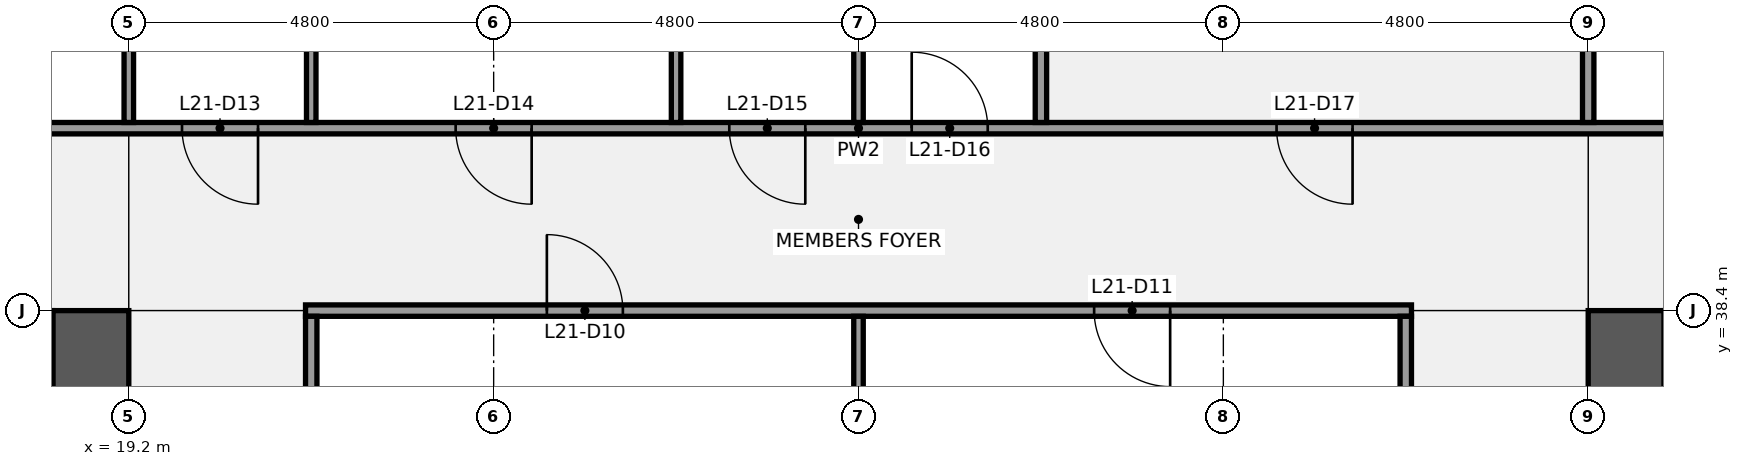
"""IFC4 building model, lengths in metres.
Left out: names, types, materials, properties, quantities, classifications, styles, units other than length and angle.
Written with IfcOpenShell. Run it as: python <this file> out.ifc"""

import sys

from ifc_helpers import new_model, si_unit, direction, frame, frame_2d, origin, place, context, subcontext, project, spatial, rectangle, extrude, element, fill, save


model = new_model("IFC4")
c1 = context("Model", 3, precision=1e-05, world=origin(), true_north=direction((0.0, 1.0)))
c2 = subcontext(c1, "Body", "Model", "MODEL_VIEW")
j1 = project(units=[si_unit("LENGTHUNIT", "METRE"), si_unit("PLANEANGLEUNIT", "RADIAN")], contexts=[c1])
p1 = place(None, origin())
s1 = spatial("IfcSite", under=j1, at=p1, CompositionType="ELEMENT")
p2 = place(p1, origin())
s2 = spatial("IfcBuilding", under=s1, at=p2, CompositionType="ELEMENT")
p3 = place(p2, frame((0.0, 0.0, 104.1)))
s3 = spatial("IfcBuildingStorey", under=s2, at=p3, CompositionType="ELEMENT", Elevation=104.1)
p4 = place(p3, frame((18.7, 38.4, 0.0), z_axis=(0.0, 0.0, 1.0), x_axis=(0.0, -1.0, 0.0)))
e1 = element("IfcWall", 1, at=p4, inside=s3, PredefinedType="SHEAR", context=c2, shape_type="SweptSolid", body=[
    extrude(rectangle(XDim=28.8, YDim=1.0, at=frame_2d((14.4, 0.0))), origin(), (0.0, 0.0, 1.0), 3.84),
])
p5 = place(p4, frame((18.3, 0.0, 0.0)))
e2 = element("IfcOpeningElement", 2, at=p5, cuts=e1, PredefinedType="OPENING", context=c2, shape_type="SweptSolid", body=[
    extrude(rectangle(XDim=1.8, YDim=2.1, at=frame_2d((0.9, 1.05))), frame((0.0, 0.51, 0.0), z_axis=(0.0, -1.0, 0.0), x_axis=(1.0, 0.0, 0.0)), (0.0, 0.0, 1.0), 1.02),
])
p6 = place(p4, frame((8.7, 0.0, 0.0)))
e3 = element("IfcOpeningElement", 3, at=p6, cuts=e1, PredefinedType="OPENING", context=c2, shape_type="SweptSolid", body=[
    extrude(rectangle(XDim=1.8, YDim=2.1, at=frame_2d((0.9, 1.05))), frame((0.0, 0.51, 0.0), z_axis=(0.0, -1.0, 0.0), x_axis=(1.0, 0.0, 0.0)), (0.0, 0.0, 1.0), 1.02),
])
p7 = place(p3, frame((38.9, 9.6, 0.0), z_axis=(0.0, 0.0, 1.0), x_axis=(0.0, 1.0, 0.0)))
e4 = element("IfcWall", 4, at=p7, inside=s3, PredefinedType="SHEAR", context=c2, shape_type="SweptSolid", body=[
    extrude(rectangle(XDim=28.8, YDim=1.0, at=frame_2d((14.4, 0.0))), origin(), (0.0, 0.0, 1.0), 3.84),
])
p8 = place(p7, frame((8.7, 0.0, 0.0)))
e5 = element("IfcOpeningElement", 5, at=p8, cuts=e4, PredefinedType="OPENING", context=c2, shape_type="SweptSolid", body=[
    extrude(rectangle(XDim=1.8, YDim=2.1, at=frame_2d((0.9, 1.05))), frame((0.0, 0.51, 0.0), z_axis=(0.0, -1.0, 0.0), x_axis=(1.0, 0.0, 0.0)), (0.0, 0.0, 1.0), 1.02),
])
p9 = place(p7, frame((18.3, 0.0, 0.0)))
e6 = element("IfcOpeningElement", 6, at=p9, cuts=e4, PredefinedType="OPENING", context=c2, shape_type="SweptSolid", body=[
    extrude(rectangle(XDim=1.8, YDim=2.1, at=frame_2d((0.9, 1.05))), frame((0.0, 0.51, 0.0), z_axis=(0.0, -1.0, 0.0), x_axis=(1.0, 0.0, 0.0)), (0.0, 0.0, 1.0), 1.02),
])
p10 = place(p3, frame((21.525, 38.4, 0.0), z_axis=(0.0, 0.0, 1.0), x_axis=(1.0, 0.0, 0.0)))
e7 = element("IfcWall", 7, at=p10, inside=s3, PredefinedType="PARTITIONING", context=c2, shape_type="SweptSolid", body=[
    extrude(rectangle(XDim=14.55, YDim=0.15, at=frame_2d((7.275, 0.0))), origin(), (0.0, 0.0, 1.0), 2.936),
])
p11 = place(p10, frame((3.175, 0.0, 0.0)))
e8 = element("IfcOpeningElement", 8, at=p11, cuts=e7, PredefinedType="OPENING", context=c2, shape_type="SweptSolid", body=[
    extrude(rectangle(XDim=1.0, YDim=2.1, at=frame_2d((0.5, 1.05))), frame((0.0, 0.085, 0.0), z_axis=(0.0, -1.0, 0.0), x_axis=(1.0, 0.0, 0.0)), (0.0, 0.0, 1.0), 0.17),
])
p12 = place(p10, frame((10.375, 0.0, 0.0)))
e9 = element("IfcOpeningElement", 9, at=p12, cuts=e7, PredefinedType="OPENING", context=c2, shape_type="SweptSolid", body=[
    extrude(rectangle(XDim=1.0, YDim=2.1, at=frame_2d((0.5, 1.05))), frame((0.0, 0.085, 0.0), z_axis=(0.0, -1.0, 0.0), x_axis=(1.0, 0.0, 0.0)), (0.0, 0.0, 1.0), 0.17),
])
p13 = place(p3, frame((9.525, 40.8, 0.0), z_axis=(0.0, 0.0, 1.0), x_axis=(1.0, 0.0, 0.0)))
e10 = element("IfcWall", 10, at=p13, inside=s3, PredefinedType="PARTITIONING", context=c2, shape_type="SweptSolid", body=[
    extrude(rectangle(XDim=38.55, YDim=0.15, at=frame_2d((19.275, 0.0))), origin(), (0.0, 0.0, 1.0), 2.936),
])
p14 = place(p13, frame((4.375, 0.0, 0.0)))
e11 = element("IfcOpeningElement", 11, at=p14, cuts=e10, PredefinedType="OPENING", context=c2, shape_type="SweptSolid", body=[
    extrude(rectangle(XDim=1.0, YDim=2.1, at=frame_2d((0.5, 1.05))), frame((0.0, 0.085, 0.0), z_axis=(0.0, -1.0, 0.0), x_axis=(1.0, 0.0, 0.0)), (0.0, 0.0, 1.0), 0.17),
])
p15 = place(p13, frame((10.375, 0.0, 0.0)))
e12 = element("IfcOpeningElement", 12, at=p15, cuts=e10, PredefinedType="OPENING", context=c2, shape_type="SweptSolid", body=[
    extrude(rectangle(XDim=1.0, YDim=2.1, at=frame_2d((0.5, 1.05))), frame((0.0, 0.085, 0.0), z_axis=(0.0, -1.0, 0.0), x_axis=(1.0, 0.0, 0.0)), (0.0, 0.0, 1.0), 0.17),
])
p16 = place(p13, frame((13.975, 0.0, 0.0)))
e13 = element("IfcOpeningElement", 13, at=p16, cuts=e10, PredefinedType="OPENING", context=c2, shape_type="SweptSolid", body=[
    extrude(rectangle(XDim=1.0, YDim=2.1, at=frame_2d((0.5, 1.05))), frame((0.0, 0.085, 0.0), z_axis=(0.0, -1.0, 0.0), x_axis=(1.0, 0.0, 0.0)), (0.0, 0.0, 1.0), 0.17),
])
p17 = place(p13, frame((17.575, 0.0, 0.0)))
e14 = element("IfcOpeningElement", 14, at=p17, cuts=e10, PredefinedType="OPENING", context=c2, shape_type="SweptSolid", body=[
    extrude(rectangle(XDim=1.0, YDim=2.1, at=frame_2d((0.5, 1.05))), frame((0.0, 0.085, 0.0), z_axis=(0.0, -1.0, 0.0), x_axis=(1.0, 0.0, 0.0)), (0.0, 0.0, 1.0), 0.17),
])
p18 = place(p13, frame((19.975, 0.0, 0.0)))
e15 = element("IfcOpeningElement", 15, at=p18, cuts=e10, PredefinedType="OPENING", context=c2, shape_type="SweptSolid", body=[
    extrude(rectangle(XDim=1.0, YDim=2.1, at=frame_2d((0.5, 1.05))), frame((0.0, 0.085, 0.0), z_axis=(0.0, -1.0, 0.0), x_axis=(1.0, 0.0, 0.0)), (0.0, 0.0, 1.0), 0.17),
])
p19 = place(p13, frame((24.775, 0.0, 0.0)))
e16 = element("IfcOpeningElement", 16, at=p19, cuts=e10, PredefinedType="OPENING", context=c2, shape_type="SweptSolid", body=[
    extrude(rectangle(XDim=1.0, YDim=2.1, at=frame_2d((0.5, 1.05))), frame((0.0, 0.085, 0.0), z_axis=(0.0, -1.0, 0.0), x_axis=(1.0, 0.0, 0.0)), (0.0, 0.0, 1.0), 0.17),
])
p20 = place(p13, frame((33.175, 0.0, 0.0)))
e17 = element("IfcOpeningElement", 17, at=p20, cuts=e10, PredefinedType="OPENING", context=c2, shape_type="SweptSolid", body=[
    extrude(rectangle(XDim=1.0, YDim=2.1, at=frame_2d((0.5, 1.05))), frame((0.0, 0.085, 0.0), z_axis=(0.0, -1.0, 0.0), x_axis=(1.0, 0.0, 0.0)), (0.0, 0.0, 1.0), 0.17),
])
p21 = place(p3, frame((19.2, 40.875, 0.0), z_axis=(0.0, 0.0, 1.0), x_axis=(0.0, 1.0, 0.0)))
e18 = element("IfcWall", 18, at=p21, inside=s3, PredefinedType="PARTITIONING", context=c2, shape_type="SweptSolid", body=[
    extrude(rectangle(XDim=6.525, YDim=0.125, at=frame_2d((3.262, 0.0))), origin(), (0.0, 0.0, 1.0), 2.936),
])
p22 = place(p3, frame((21.6, 40.875, 0.0), z_axis=(0.0, 0.0, 1.0), x_axis=(0.0, 1.0, 0.0)))
e19 = element("IfcWall", 19, at=p22, inside=s3, PredefinedType="PARTITIONING", context=c2, shape_type="SweptSolid", body=[
    extrude(rectangle(XDim=7.025, YDim=0.125, at=frame_2d((3.512, 0.0))), origin(), (0.0, 0.0, 1.0), 2.936),
])
p23 = place(p3, frame((21.6, 33.675, 0.0), z_axis=(0.0, 0.0, 1.0), x_axis=(0.0, 1.0, 0.0)))
e20 = element("IfcWall", 20, at=p23, inside=s3, PredefinedType="PARTITIONING", context=c2, shape_type="SweptSolid", body=[
    extrude(rectangle(XDim=4.65, YDim=0.15, at=frame_2d((2.325, 0.0))), origin(), (0.0, 0.0, 1.0), 2.936),
])
p24 = place(p3, frame((26.4, 40.875, 0.0), z_axis=(0.0, 0.0, 1.0), x_axis=(0.0, 1.0, 0.0)))
e21 = element("IfcWall", 21, at=p24, inside=s3, PredefinedType="PARTITIONING", context=c2, shape_type="SweptSolid", body=[
    extrude(rectangle(XDim=7.025, YDim=0.125, at=frame_2d((3.512, 0.0))), origin(), (0.0, 0.0, 1.0), 2.936),
])
p25 = place(p3, frame((28.8, 33.663, 0.0), z_axis=(0.0, 0.0, 1.0), x_axis=(0.0, 1.0, 0.0)))
e22 = element("IfcWall", 22, at=p25, inside=s3, PredefinedType="PARTITIONING", context=c2, shape_type="SweptSolid", body=[
    extrude(rectangle(XDim=4.662, YDim=0.125, at=frame_2d((2.331, 0.0))), origin(), (0.0, 0.0, 1.0), 2.936),
])
p26 = place(p3, frame((28.8, 40.875, 0.0), z_axis=(0.0, 0.0, 1.0), x_axis=(0.0, 1.0, 0.0)))
e23 = element("IfcWall", 23, at=p26, inside=s3, PredefinedType="PARTITIONING", context=c2, shape_type="SweptSolid", body=[
    extrude(rectangle(XDim=6.525, YDim=0.125, at=frame_2d((3.262, 0.0))), origin(), (0.0, 0.0, 1.0), 2.936),
])
p27 = place(p3, frame((31.2, 40.875, 0.0), z_axis=(0.0, 0.0, 1.0), x_axis=(0.0, 1.0, 0.0)))
e24 = element("IfcWall", 24, at=p27, inside=s3, PredefinedType="PARTITIONING", context=c2, shape_type="SweptSolid", body=[
    extrude(rectangle(XDim=3.45, YDim=0.15, at=frame_2d((1.725, 0.0))), origin(), (0.0, 0.0, 1.0), 2.936),
])
p28 = place(p3, frame((36.0, 33.675, 0.0), z_axis=(0.0, 0.0, 1.0), x_axis=(0.0, 1.0, 0.0)))
e25 = element("IfcWall", 25, at=p28, inside=s3, PredefinedType="PARTITIONING", context=c2, shape_type="SweptSolid", body=[
    extrude(rectangle(XDim=4.65, YDim=0.15, at=frame_2d((2.325, 0.0))), origin(), (0.0, 0.0, 1.0), 2.936),
])
p29 = place(p3, frame((38.4, 40.875, 0.0), z_axis=(0.0, 0.0, 1.0), x_axis=(0.0, 1.0, 0.0)))
e26 = element("IfcWall", 26, at=p29, inside=s3, PredefinedType="PARTITIONING", context=c2, shape_type="SweptSolid", body=[
    extrude(rectangle(XDim=3.45, YDim=0.15, at=frame_2d((1.725, 0.0))), origin(), (0.0, 0.0, 1.0), 2.936),
])
p30 = place(p11, origin())
e27 = element("IfcDoor", 27, at=p30, inside=s3, OperationType="SINGLE_SWING_LEFT", PredefinedType="DOOR", context=c2, shape_type="SweptSolid", body=[
    extrude(rectangle(XDim=1.0, YDim=2.1, at=frame_2d((0.5, 1.05))), frame((0.0, 0.025, 0.0), z_axis=(0.0, -1.0, 0.0), x_axis=(1.0, 0.0, 0.0)), (0.0, 0.0, 1.0), 0.05),
])
fill(e8, e27)
p31 = place(p12, origin())
e28 = element("IfcDoor", 28, at=p31, inside=s3, OperationType="SINGLE_SWING_RIGHT", PredefinedType="DOOR", context=c2, shape_type="SweptSolid", body=[
    extrude(rectangle(XDim=1.0, YDim=2.1, at=frame_2d((0.5, 1.05))), frame((0.0, 0.025, 0.0), z_axis=(0.0, -1.0, 0.0), x_axis=(1.0, 0.0, 0.0)), (0.0, 0.0, 1.0), 0.05),
])
fill(e9, e28)
p32 = place(p15, origin())
e29 = element("IfcDoor", 29, at=p32, inside=s3, OperationType="SINGLE_SWING_RIGHT", PredefinedType="DOOR", context=c2, shape_type="SweptSolid", body=[
    extrude(rectangle(XDim=1.0, YDim=2.1, at=frame_2d((0.5, 1.05))), frame((0.0, 0.025, 0.0), z_axis=(0.0, -1.0, 0.0), x_axis=(1.0, 0.0, 0.0)), (0.0, 0.0, 1.0), 0.05),
])
fill(e12, e29)
p33 = place(p16, origin())
e30 = element("IfcDoor", 30, at=p33, inside=s3, OperationType="SINGLE_SWING_RIGHT", PredefinedType="DOOR", context=c2, shape_type="SweptSolid", body=[
    extrude(rectangle(XDim=1.0, YDim=2.1, at=frame_2d((0.5, 1.05))), frame((0.0, 0.025, 0.0), z_axis=(0.0, -1.0, 0.0), x_axis=(1.0, 0.0, 0.0)), (0.0, 0.0, 1.0), 0.05),
])
fill(e13, e30)
p34 = place(p17, origin())
e31 = element("IfcDoor", 31, at=p34, inside=s3, OperationType="SINGLE_SWING_RIGHT", PredefinedType="DOOR", context=c2, shape_type="SweptSolid", body=[
    extrude(rectangle(XDim=1.0, YDim=2.1, at=frame_2d((0.5, 1.05))), frame((0.0, 0.025, 0.0), z_axis=(0.0, -1.0, 0.0), x_axis=(1.0, 0.0, 0.0)), (0.0, 0.0, 1.0), 0.05),
])
fill(e14, e31)
p35 = place(p18, origin())
e32 = element("IfcDoor", 32, at=p35, inside=s3, OperationType="SINGLE_SWING_LEFT", PredefinedType="DOOR", context=c2, shape_type="SweptSolid", body=[
    extrude(rectangle(XDim=1.0, YDim=2.1, at=frame_2d((0.5, 1.05))), frame((0.0, 0.025, 0.0), z_axis=(0.0, -1.0, 0.0), x_axis=(1.0, 0.0, 0.0)), (0.0, 0.0, 1.0), 0.05),
])
fill(e15, e32)
p36 = place(p19, origin())
e33 = element("IfcDoor", 33, at=p36, inside=s3, OperationType="SINGLE_SWING_RIGHT", PredefinedType="DOOR", context=c2, shape_type="SweptSolid", body=[
    extrude(rectangle(XDim=1.0, YDim=2.1, at=frame_2d((0.5, 1.05))), frame((0.0, 0.025, 0.0), z_axis=(0.0, -1.0, 0.0), x_axis=(1.0, 0.0, 0.0)), (0.0, 0.0, 1.0), 0.05),
])
fill(e16, e33)
save(model, sys.argv[1])
